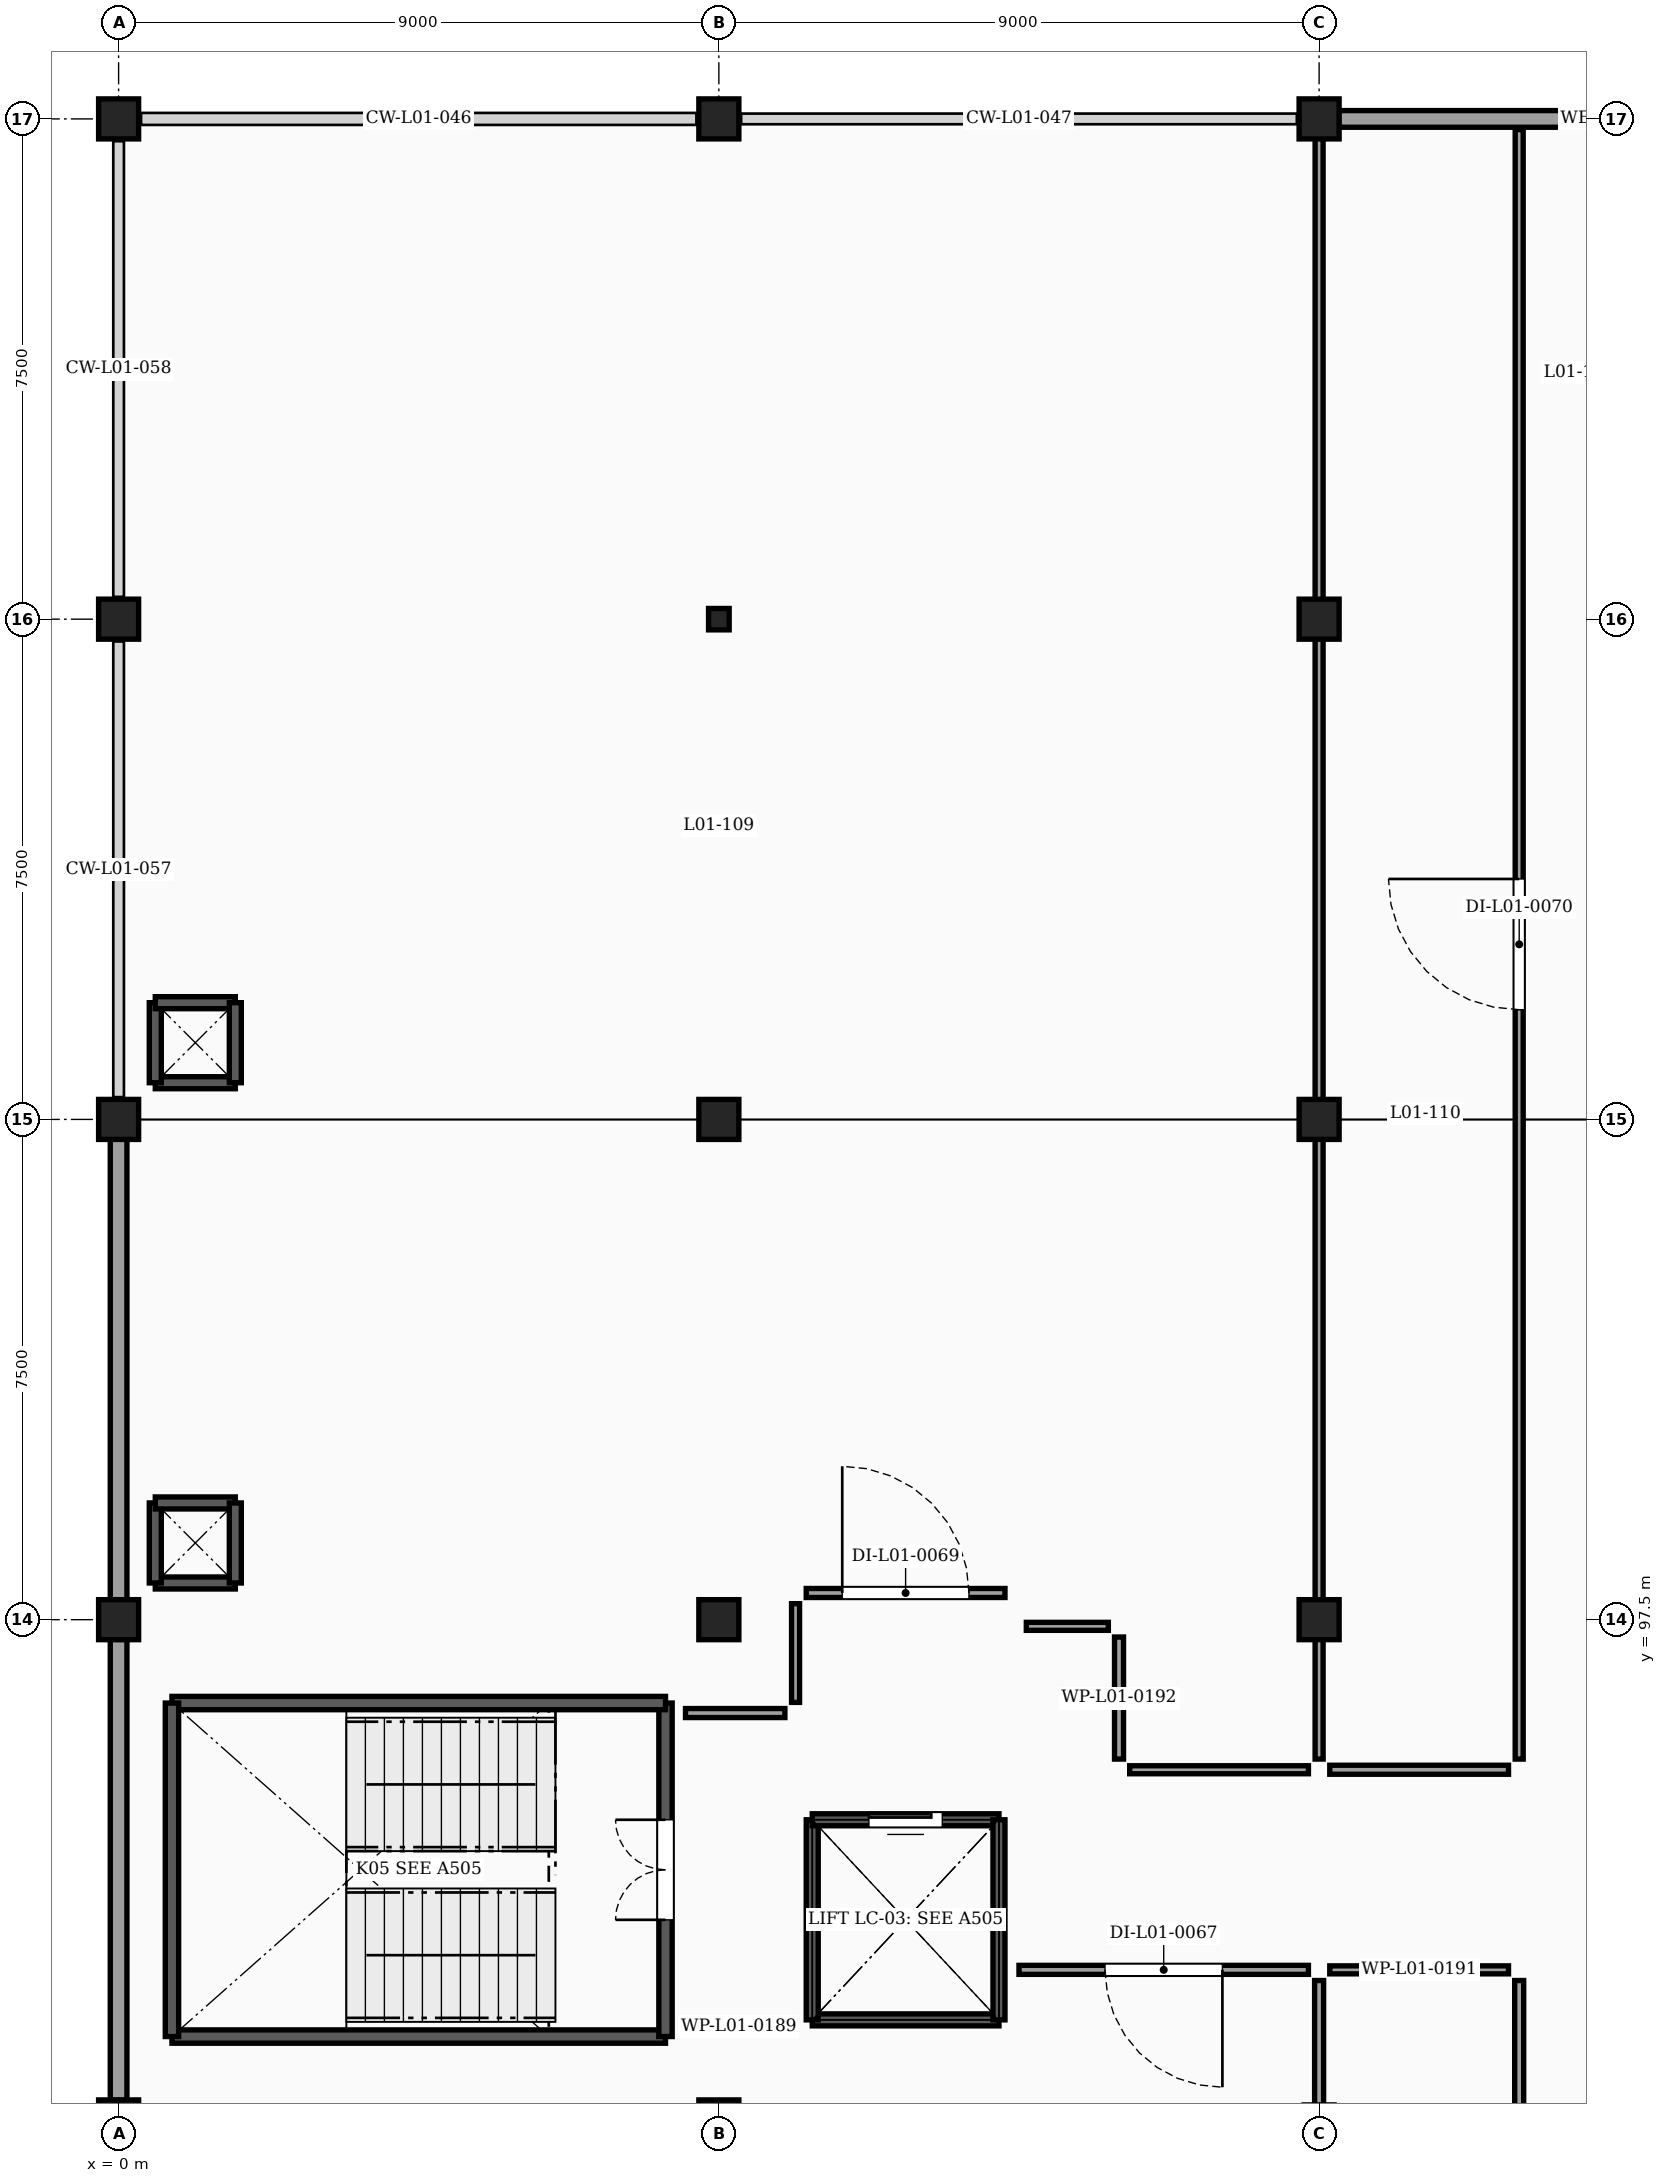
"""IFC4 building model, lengths in metres.
Left out: names, types, materials, properties, quantities, classifications, styles, units other than length and angle.
Written with IfcOpenShell. Run it as: python <this file> out.ifc"""

import sys

from ifc_helpers import new_model, si_unit, direction, frame, frame_2d, origin, origin_2d, place, context, subcontext, project, spatial, rectangle, i_section, extrude, element, fill, save


model = new_model("IFC4")
c1 = context("Model", 3, precision=1e-05, world=origin(), true_north=direction((0.0, 1.0)))
c2 = subcontext(c1, "Body", "Model", "MODEL_VIEW")
j1 = project(units=[si_unit("LENGTHUNIT", "METRE"), si_unit("PLANEANGLEUNIT", "RADIAN")], contexts=[c1])
p1 = place(None, origin())
s1 = spatial("IfcSite", under=j1, at=p1, CompositionType="ELEMENT")
p2 = place(p1, origin())
s2 = spatial("IfcBuilding", under=s1, at=p2, CompositionType="ELEMENT")
p3 = place(p2, frame((0.0, 0.0, 4.5)))
s3 = spatial("IfcBuildingStorey", under=s2, at=p3, CompositionType="ELEMENT", Elevation=4.5)
for number, where, z_axis, x_axis in (
    (1, (0.0, 90.0, 0.0), (0.0, 0.0, 1.0), (1.0, 0.0, 0.0)),
    (2, (9.0, 90.0, 0.0), (0.0, 0.0, 1.0), (1.0, 0.0, 0.0)),
    (3, (0.0, 97.5, 0.0), (0.0, 0.0, 1.0), (1.0, 0.0, 0.0)),
    (4, (9.0, 97.5, 0.0), (0.0, 0.0, 1.0), (1.0, 0.0, 0.0)),
    (5, (18.0, 97.5, 0.0), (0.0, 0.0, 1.0), (1.0, 0.0, 0.0)),
    (6, (0.0, 105.0, 0.0), (0.0, 0.0, 1.0), (1.0, 0.0, 0.0)),
    (7, (9.0, 105.0, 0.0), (0.0, 0.0, 1.0), (1.0, 0.0, 0.0)),
    (8, (18.0, 105.0, 0.0), (0.0, 0.0, 1.0), (1.0, 0.0, 0.0)),
    (9, (0.0, 112.5, 0.0), (0.0, 0.0, 1.0), (1.0, 0.0, 0.0)),
):
    element("IfcColumn", number, at=place(p3, frame(where, z_axis=z_axis, x_axis=x_axis)), inside=s3, PredefinedType="COLUMN", context=c2, shape_type="SweptSolid", body=[
        extrude(rectangle(XDim=0.6, YDim=0.6, at=origin_2d()), origin(), (0.0, 0.0, 1.0), 4.0),
    ])
p4 = place(p3, frame((9.0, 112.5, 0.0), z_axis=(0.0, 0.0, 1.0), x_axis=(1.0, 0.0, 0.0)))
e10 = element("IfcColumn", 10, at=p4, inside=s3, PredefinedType="COLUMN", context=c2, shape_type="SweptSolid", body=[
    extrude(i_section(OverallWidth=0.309, OverallDepth=0.321, WebThickness=0.014, FlangeThickness=0.022, FilletRadius=0.017, at=origin_2d()), origin(), (0.0, 0.0, 1.0), 4.0),
])
for number, where, z_axis, x_axis in (
    (11, (18.0, 112.5, 0.0), (0.0, 0.0, 1.0), (1.0, 0.0, 0.0)),
    (12, (0.0, 120.0, 0.0), (0.0, 0.0, 1.0), (1.0, 0.0, 0.0)),
    (13, (9.0, 120.0, 0.0), (0.0, 0.0, 1.0), (1.0, 0.0, 0.0)),
    (14, (18.0, 120.0, 0.0), (0.0, 0.0, 1.0), (1.0, 0.0, 0.0)),
):
    element("IfcColumn", number, at=place(p3, frame(where, z_axis=z_axis, x_axis=x_axis)), inside=s3, PredefinedType="COLUMN", context=c2, shape_type="SweptSolid", body=[
        extrude(rectangle(XDim=0.6, YDim=0.6, at=origin_2d()), origin(), (0.0, 0.0, 1.0), 4.0),
    ])
p5 = place(p3, frame((18.296, 120.0, 0.0), z_axis=(0.0, 0.0, 1.0), x_axis=(1.0, 0.0, 0.0)))
e15 = element("IfcWall", 15, at=p5, inside=s3, PredefinedType="SOLIDWALL", context=c2, shape_type="SweptSolid", body=[
    extrude(rectangle(XDim=8.408, YDim=0.25, at=frame_2d((4.204, 0.0))), origin(), (0.0, 0.0, 1.0), 3.4),
])
for number, where, z_axis, x_axis in (
    (16, (0.0, 90.296, 0.0), (0.0, 0.0, 1.0), (0.0, 1.0, 0.0)),
    (17, (0.0, 97.796, 0.0), (0.0, 0.0, 1.0), (0.0, 1.0, 0.0)),
):
    element("IfcWall", number, at=place(p3, frame(where, z_axis=z_axis, x_axis=x_axis)), inside=s3, PredefinedType="SOLIDWALL", context=c2, shape_type="SweptSolid", body=[
        extrude(rectangle(XDim=6.908, YDim=0.25, at=frame_2d((3.454, 0.0))), origin(), (0.0, 0.0, 1.0), 3.4),
    ])
for number, where, z_axis, x_axis in (
    (18, (1.75, 98.05, 0.0), (0.0, 0.0, 1.0), (-1.0, 0.0, 0.0)),
    (19, (0.55, 98.05, 0.0), (0.0, 0.0, 1.0), (0.0, 1.0, 0.0)),
    (20, (0.55, 99.25, 0.0), (0.0, 0.0, 1.0), (1.0, 0.0, 0.0)),
    (21, (1.75, 99.25, 0.0), (0.0, 0.0, 1.0), (0.0, -1.0, 0.0)),
    (22, (1.75, 105.55, 0.0), (0.0, 0.0, 1.0), (-1.0, 0.0, 0.0)),
    (23, (0.55, 105.55, 0.0), (0.0, 0.0, 1.0), (0.0, 1.0, 0.0)),
    (24, (0.55, 106.75, 0.0), (0.0, 0.0, 1.0), (1.0, 0.0, 0.0)),
    (25, (1.75, 106.75, 0.0), (0.0, 0.0, 1.0), (0.0, -1.0, 0.0)),
):
    element("IfcWall", number, at=place(p3, frame(where, z_axis=z_axis, x_axis=x_axis)), inside=s3, PredefinedType="SHEAR", context=c2, shape_type="SweptSolid", body=[
        extrude(rectangle(XDim=1.2, YDim=0.18, at=frame_2d((0.6, 0.0))), origin(), (0.0, 0.0, 1.0), 3.76),
    ])
p6 = place(p3, frame((0.8, 91.25, 0.0), z_axis=(0.0, 0.0, 1.0), x_axis=(1.0, 0.0, 0.0)))
e26 = element("IfcWall", 26, at=p6, inside=s3, PredefinedType="SHEAR", context=c2, shape_type="SweptSolid", body=[
    extrude(rectangle(XDim=7.4, YDim=0.2, at=frame_2d((3.7, 0.0))), origin(), (0.0, 0.0, 1.0), 3.76),
])
p7 = place(p3, frame((8.2, 91.25, 0.0), z_axis=(0.0, 0.0, 1.0), x_axis=(0.0, 1.0, 0.0)))
e27 = element("IfcWall", 27, at=p7, inside=s3, PredefinedType="SHEAR", context=c2, shape_type="SweptSolid", body=[
    extrude(rectangle(XDim=5.0, YDim=0.2, at=frame_2d((2.5, 0.0))), origin(), (0.0, 0.0, 1.0), 3.76),
])
p8 = place(p7, frame((1.75, 0.0, 0.0)))
e28 = element("IfcOpeningElement", 28, at=p8, cuts=e27, PredefinedType="OPENING", context=c2, shape_type="SweptSolid", body=[
    extrude(rectangle(XDim=1.5, YDim=2.15, at=frame_2d((0.75, 1.075))), frame((0.0, 0.11, 0.0), z_axis=(0.0, -1.0, 0.0), x_axis=(1.0, 0.0, 0.0)), (0.0, 0.0, 1.0), 0.22),
])
p9 = place(p3, frame((8.2, 96.25, 0.0), z_axis=(0.0, 0.0, 1.0), x_axis=(-1.0, 0.0, 0.0)))
e29 = element("IfcWall", 29, at=p9, inside=s3, PredefinedType="SHEAR", context=c2, shape_type="SweptSolid", body=[
    extrude(rectangle(XDim=7.4, YDim=0.2, at=frame_2d((3.7, 0.0))), origin(), (0.0, 0.0, 1.0), 3.76),
])
p10 = place(p3, frame((0.8, 96.25, 0.0), z_axis=(0.0, 0.0, 1.0), x_axis=(0.0, -1.0, 0.0)))
e30 = element("IfcWall", 30, at=p10, inside=s3, PredefinedType="SHEAR", context=c2, shape_type="SweptSolid", body=[
    extrude(rectangle(XDim=5.0, YDim=0.2, at=frame_2d((2.5, 0.0))), origin(), (0.0, 0.0, 1.0), 3.76),
])
p11 = place(p3, frame((13.2, 91.5, 0.0), z_axis=(0.0, 0.0, 1.0), x_axis=(-1.0, 0.0, 0.0)))
e31 = element("IfcWall", 31, at=p11, inside=s3, PredefinedType="SHEAR", context=c2, shape_type="SweptSolid", body=[
    extrude(rectangle(XDim=2.8, YDim=0.18, at=frame_2d((1.4, 0.0))), origin(), (0.0, 0.0, 1.0), 3.76),
])
p12 = place(p3, frame((10.4, 91.5, 0.0), z_axis=(0.0, 0.0, 1.0), x_axis=(0.0, 1.0, 0.0)))
e32 = element("IfcWall", 32, at=p12, inside=s3, PredefinedType="SHEAR", context=c2, shape_type="SweptSolid", body=[
    extrude(rectangle(XDim=3.0, YDim=0.18, at=frame_2d((1.5, 0.0))), origin(), (0.0, 0.0, 1.0), 3.76),
])
p13 = place(p3, frame((10.4, 94.5, 0.0), z_axis=(0.0, 0.0, 1.0), x_axis=(1.0, 0.0, 0.0)))
e33 = element("IfcWall", 33, at=p13, inside=s3, PredefinedType="SHEAR", context=c2, shape_type="SweptSolid", body=[
    extrude(rectangle(XDim=2.8, YDim=0.18, at=frame_2d((1.4, 0.0))), origin(), (0.0, 0.0, 1.0), 3.76),
])
p14 = place(p13, frame((0.85, 0.0, 0.0)))
e34 = element("IfcOpeningElement", 34, at=p14, cuts=e33, PredefinedType="OPENING", context=c2, shape_type="SweptSolid", body=[
    extrude(rectangle(XDim=1.1, YDim=2.15, at=frame_2d((0.55, 1.075))), frame((0.0, 0.1, 0.0), z_axis=(0.0, -1.0, 0.0), x_axis=(1.0, 0.0, 0.0)), (0.0, 0.0, 1.0), 0.2),
])
p15 = place(p3, frame((13.2, 94.5, 0.0), z_axis=(0.0, 0.0, 1.0), x_axis=(0.0, -1.0, 0.0)))
e35 = element("IfcWall", 35, at=p15, inside=s3, PredefinedType="SHEAR", context=c2, shape_type="SweptSolid", body=[
    extrude(rectangle(XDim=3.0, YDim=0.18, at=frame_2d((1.5, 0.0))), origin(), (0.0, 0.0, 1.0), 3.76),
])
p16 = place(p3, frame((17.84, 92.25, 0.0), z_axis=(0.0, 0.0, 1.0), x_axis=(-1.0, 0.0, 0.0)))
e36 = element("IfcWall", 36, at=p16, inside=s3, PredefinedType="PARTITIONING", context=c2, shape_type="SweptSolid", body=[
    extrude(rectangle(XDim=4.34, YDim=0.135, at=frame_2d((2.17, 0.0))), origin(), (0.0, 0.0, 1.0), 3.76),
])
p17 = place(p16, frame((1.29, 0.0, 0.0)))
e37 = element("IfcOpeningElement", 37, at=p17, cuts=e36, PredefinedType="OPENING", context=c2, shape_type="SweptSolid", body=[
    extrude(rectangle(XDim=1.76, YDim=2.22, at=frame_2d((0.88, 1.11))), frame((0.0, 0.077, 0.0), z_axis=(0.0, -1.0, 0.0), x_axis=(1.0, 0.0, 0.0)), (0.0, 0.0, 1.0), 0.155),
])
p18 = place(p3, frame((10.1, 91.4, 0.0), z_axis=(0.0, 0.0, 1.0), x_axis=(-1.0, 0.0, 0.0)))
e38 = element("IfcWall", 38, at=p18, inside=s3, PredefinedType="PARTITIONING", context=c2, shape_type="SweptSolid", body=[
    extrude(rectangle(XDim=1.6, YDim=0.1, at=frame_2d((0.8, 0.0))), origin(), (0.0, 0.0, 1.0), 3.76),
])
p19 = place(p3, frame((21.0, 82.66, 0.0), z_axis=(0.0, 0.0, 1.0), x_axis=(0.0, 1.0, 0.0)))
e39 = element("IfcWall", 39, at=p19, inside=s3, PredefinedType="PARTITIONING", context=c2, shape_type="SweptSolid", body=[
    extrude(rectangle(XDim=9.43, YDim=0.135, at=frame_2d((4.715, 0.0))), origin(), (0.0, 0.0, 1.0), 3.302),
])
p20 = place(p19, frame((3.795, 0.0, 0.0)))
e40 = element("IfcOpeningElement", 40, at=p20, cuts=e39, PredefinedType="OPENING", context=c2, shape_type="SweptSolid", body=[
    extrude(rectangle(XDim=1.84, YDim=2.22, at=frame_2d((0.92, 1.11))), frame((0.0, 0.077, 0.0), z_axis=(0.0, -1.0, 0.0), x_axis=(1.0, 0.0, 0.0)), (0.0, 0.0, 1.0), 0.155),
])
p21 = place(p3, frame((20.84, 92.25, 0.0), z_axis=(0.0, 0.0, 1.0), x_axis=(-1.0, 0.0, 0.0)))
e41 = element("IfcWall", 41, at=p21, inside=s3, PredefinedType="PARTITIONING", context=c2, shape_type="SweptSolid", body=[
    extrude(rectangle(XDim=2.68, YDim=0.12, at=frame_2d((1.34, 0.0))), origin(), (0.0, 0.0, 1.0), 3.76),
])
p22 = place(p3, frame((15.0, 97.24, 0.0), z_axis=(0.0, 0.0, 1.0), x_axis=(0.0, -1.0, 0.0)))
e42 = element("IfcWall", 42, at=p22, inside=s3, PredefinedType="PARTITIONING", context=c2, shape_type="SweptSolid", body=[
    extrude(rectangle(XDim=1.83, YDim=0.135, at=frame_2d((0.915, 0.0))), origin(), (0.0, 0.0, 1.0), 3.302),
])
p23 = place(p3, frame((15.16, 95.25, 0.0), z_axis=(0.0, 0.0, 1.0), x_axis=(1.0, 0.0, 0.0)))
e43 = element("IfcWall", 43, at=p23, inside=s3, PredefinedType="PARTITIONING", context=c2, shape_type="SweptSolid", body=[
    extrude(rectangle(XDim=2.68, YDim=0.12, at=frame_2d((1.34, 0.0))), origin(), (0.0, 0.0, 1.0), 3.76),
])
p24 = place(p3, frame((8.5, 96.1, 0.0), z_axis=(0.0, 0.0, 1.0), x_axis=(1.0, 0.0, 0.0)))
e44 = element("IfcWall", 44, at=p24, inside=s3, PredefinedType="PARTITIONING", context=c2, shape_type="SweptSolid", body=[
    extrude(rectangle(XDim=1.49, YDim=0.135, at=frame_2d((0.745, 0.0))), origin(), (0.0, 0.0, 1.0), 3.76),
])
p25 = place(p3, frame((10.15, 96.26, 0.0), z_axis=(0.0, 0.0, 1.0), x_axis=(0.0, 1.0, 0.0)))
e45 = element("IfcWall", 45, at=p25, inside=s3, PredefinedType="PARTITIONING", context=c2, shape_type="SweptSolid", body=[
    extrude(rectangle(XDim=1.48, YDim=0.12, at=frame_2d((0.74, 0.0))), origin(), (0.0, 0.0, 1.0), 3.76),
])
p26 = place(p3, frame((10.31, 97.9, 0.0), z_axis=(0.0, 0.0, 1.0), x_axis=(1.0, 0.0, 0.0)))
e46 = element("IfcWall", 46, at=p26, inside=s3, PredefinedType="PARTITIONING", context=c2, shape_type="SweptSolid", body=[
    extrude(rectangle(XDim=2.98, YDim=0.135, at=frame_2d((1.49, 0.0))), origin(), (0.0, 0.0, 1.0), 3.76),
])
p27 = place(p26, frame((0.54, 0.0, 0.0)))
e47 = element("IfcOpeningElement", 47, at=p27, cuts=e46, PredefinedType="OPENING", context=c2, shape_type="SweptSolid", body=[
    extrude(rectangle(XDim=1.9, YDim=2.24, at=frame_2d((0.95, 1.12))), frame((0.0, 0.077, 0.0), z_axis=(0.0, -1.0, 0.0), x_axis=(1.0, 0.0, 0.0)), (0.0, 0.0, 1.0), 0.155),
])
p28 = place(p3, frame((13.61, 97.4, 0.0), z_axis=(0.0, 0.0, 1.0), x_axis=(1.0, 0.0, 0.0)))
e48 = element("IfcWall", 48, at=p28, inside=s3, PredefinedType="PARTITIONING", context=c2, shape_type="SweptSolid", body=[
    extrude(rectangle(XDim=1.23, YDim=0.12, at=frame_2d((0.615, 0.0))), origin(), (0.0, 0.0, 1.0), 2.96),
])
p29 = place(p3, frame((18.16, 95.25, 0.0), z_axis=(0.0, 0.0, 1.0), x_axis=(1.0, 0.0, 0.0)))
e49 = element("IfcWall", 49, at=p29, inside=s3, PredefinedType="PARTITIONING", context=c2, shape_type="SweptSolid", body=[
    extrude(rectangle(XDim=2.68, YDim=0.135, at=frame_2d((1.34, 0.0))), origin(), (0.0, 0.0, 1.0), 3.76),
])
p30 = place(p3, frame((21.0, 95.41, 0.0), z_axis=(0.0, 0.0, 1.0), x_axis=(0.0, 1.0, 0.0)))
e50 = element("IfcWall", 50, at=p30, inside=s3, PredefinedType="PARTITIONING", context=c2, shape_type="SweptSolid", body=[
    extrude(rectangle(XDim=24.43, YDim=0.12, at=frame_2d((12.215, 0.0))), origin(), (0.0, 0.0, 1.0), 3.302),
])
p31 = place(p30, frame((11.235, 0.0, 0.0)))
e51 = element("IfcOpeningElement", 51, at=p31, cuts=e50, PredefinedType="OPENING", context=c2, shape_type="SweptSolid", body=[
    extrude(rectangle(XDim=1.96, YDim=2.24, at=frame_2d((0.98, 1.12))), frame((0.0, 0.07, 0.0), z_axis=(0.0, -1.0, 0.0), x_axis=(1.0, 0.0, 0.0)), (0.0, 0.0, 1.0), 0.14),
])
p32 = place(p3, frame((18.0, 82.66, 0.0), z_axis=(0.0, 0.0, 1.0), x_axis=(0.0, 1.0, 0.0)))
e52 = element("IfcWall", 52, at=p32, inside=s3, PredefinedType="PARTITIONING", context=c2, shape_type="SweptSolid", body=[
    extrude(rectangle(XDim=9.43, YDim=0.135, at=frame_2d((4.715, 0.0))), origin(), (0.0, 0.0, 1.0), 2.96),
])
p33 = place(p3, frame((18.0, 95.41, 0.0), z_axis=(0.0, 0.0, 1.0), x_axis=(0.0, 1.0, 0.0)))
e53 = element("IfcWall", 53, at=p33, inside=s3, PredefinedType="PARTITIONING", context=c2, shape_type="SweptSolid", body=[
    extrude(rectangle(XDim=24.43, YDim=0.12, at=frame_2d((12.215, 0.0))), origin(), (0.0, 0.0, 1.0), 2.96),
])
p34 = place(p8, origin())
e54 = element("IfcDoor", 54, at=p34, inside=s3, OperationType="DOUBLE_DOOR_SINGLE_SWING", PredefinedType="DOOR", context=c2, shape_type="SweptSolid", body=[
    extrude(rectangle(XDim=1.5, YDim=2.15, at=frame_2d((0.75, 1.075))), frame((0.0, 0.025, 0.0), z_axis=(0.0, -1.0, 0.0), x_axis=(1.0, 0.0, 0.0)), (0.0, 0.0, 1.0), 0.05),
])
fill(e28, e54)
p35 = place(p14, origin())
e55 = element("IfcDoor", 55, at=p35, inside=s3, OperationType="SLIDING_TO_LEFT", PredefinedType="DOOR", context=c2, shape_type="SweptSolid", body=[
    extrude(rectangle(XDim=1.1, YDim=2.15, at=frame_2d((0.55, 1.075))), frame((0.0, 0.025, 0.0), z_axis=(0.0, -1.0, 0.0), x_axis=(1.0, 0.0, 0.0)), (0.0, 0.0, 1.0), 0.05),
])
fill(e34, e55)
p36 = place(p17, origin())
e56 = element("IfcDoor", 56, at=p36, inside=s3, OperationType="SINGLE_SWING_LEFT", PredefinedType="DOOR", context=c2, shape_type="SweptSolid", body=[
    extrude(rectangle(XDim=1.76, YDim=2.22, at=frame_2d((0.88, 1.11))), frame((0.0, 0.025, 0.0), z_axis=(0.0, -1.0, 0.0), x_axis=(1.0, 0.0, 0.0)), (0.0, 0.0, 1.0), 0.05),
])
fill(e37, e56)
p37 = place(p27, origin())
e57 = element("IfcDoor", 57, at=p37, inside=s3, OperationType="SINGLE_SWING_LEFT", PredefinedType="DOOR", context=c2, shape_type="SweptSolid", body=[
    extrude(rectangle(XDim=1.9, YDim=2.24, at=frame_2d((0.95, 1.12))), frame((0.0, 0.025, 0.0), z_axis=(0.0, -1.0, 0.0), x_axis=(1.0, 0.0, 0.0)), (0.0, 0.0, 1.0), 0.05),
])
fill(e47, e57)
p38 = place(p31, origin())
e58 = element("IfcDoor", 58, at=p38, inside=s3, OperationType="SINGLE_SWING_RIGHT", PredefinedType="DOOR", context=c2, shape_type="SweptSolid", body=[
    extrude(rectangle(XDim=1.96, YDim=2.24, at=frame_2d((0.98, 1.12))), frame((0.0, 0.025, 0.0), z_axis=(0.0, -1.0, 0.0), x_axis=(1.0, 0.0, 0.0)), (0.0, 0.0, 1.0), 0.05),
])
fill(e51, e58)
save(model, sys.argv[1])
